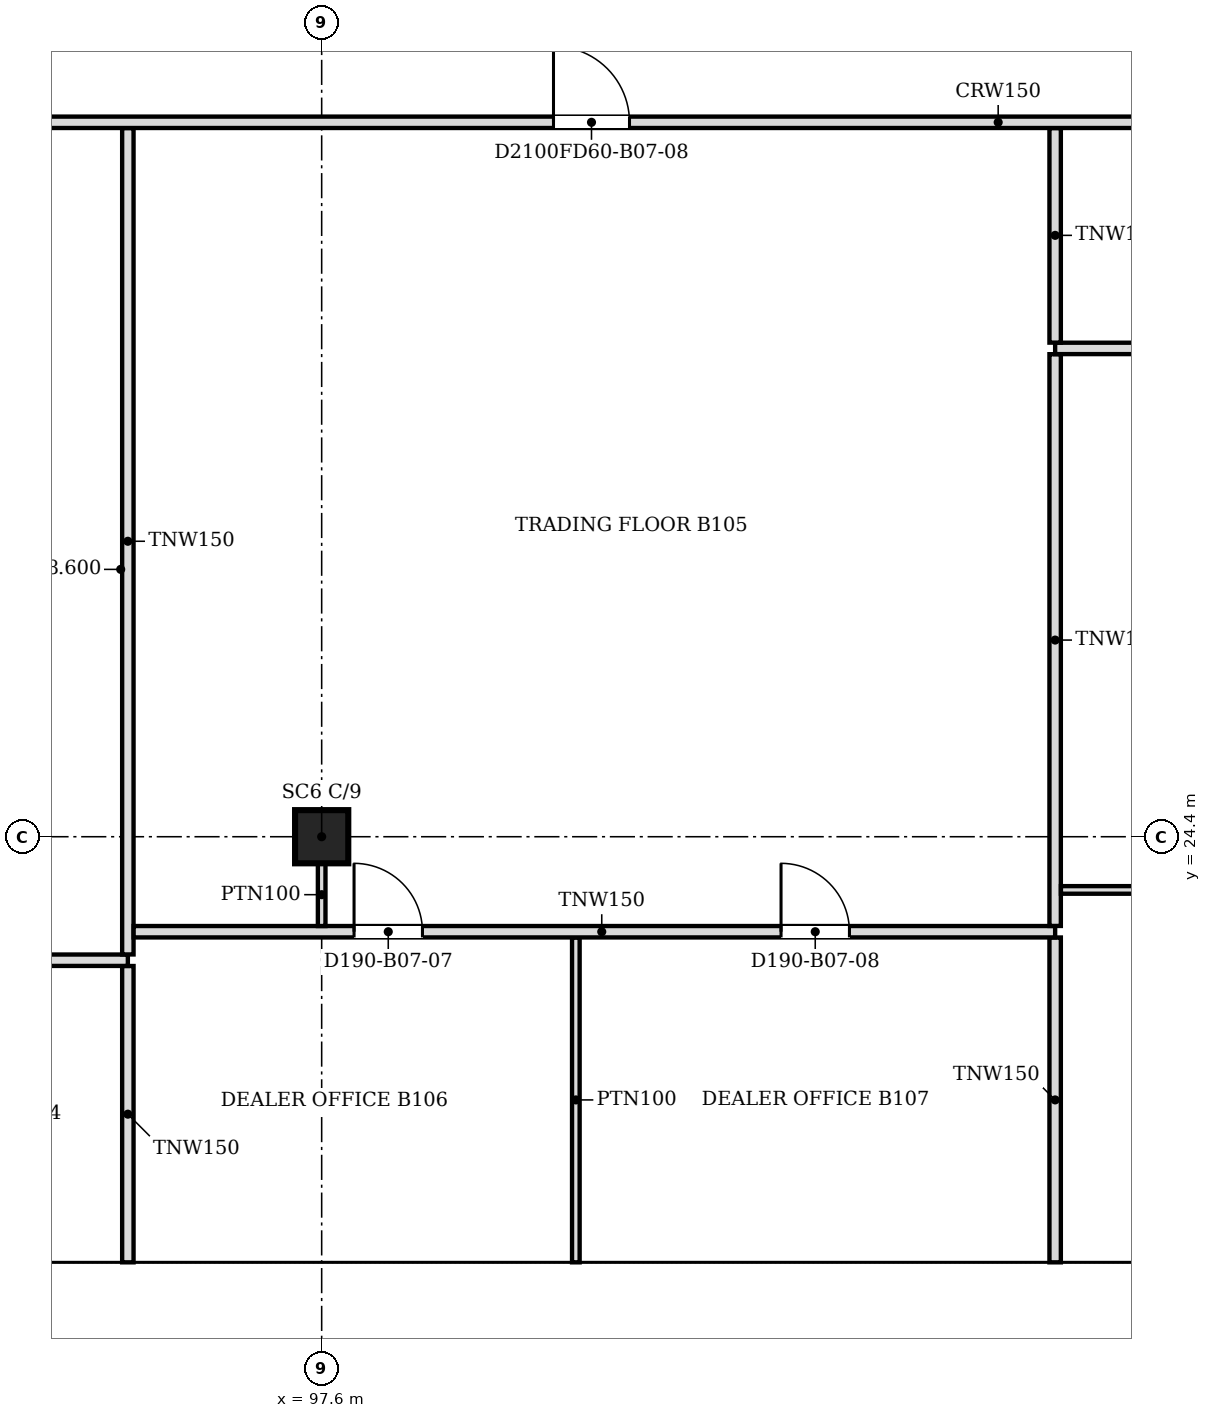
"""IFC4 building model, lengths in metres.
Left out: names, types, materials, properties, quantities, classifications, styles, units other than length and angle.
Written with IfcOpenShell. Run it as: python <this file> out.ifc"""

import sys

from ifc_helpers import new_model, si_unit, direction, frame, frame_2d, origin, origin_2d, place, context, subcontext, project, spatial, polyline, rectangle, outline, extrude, faceted_brep, source, transform, mapped, element, fill, save


model = new_model("IFC4")
c1 = context("Model", 3, precision=1e-05, world=origin(), true_north=direction((0.0, 1.0)))
c2 = subcontext(c1, "Body", "Model", "MODEL_VIEW")
j1 = project(units=[si_unit("LENGTHUNIT", "METRE"), si_unit("PLANEANGLEUNIT", "RADIAN")], contexts=[c1])
p1 = place(None, origin())
s1 = spatial("IfcSite", under=j1, at=p1, CompositionType="ELEMENT")
p2 = place(p1, origin())
s2 = spatial("IfcBuilding", under=s1, at=p2, CompositionType="ELEMENT")
p3 = place(p2, frame((0.0, 0.0, 68.6)))
s3 = spatial("IfcBuildingStorey", under=s2, at=p3, CompositionType="ELEMENT", Elevation=68.6)
p4 = place(p3, frame((97.6, 24.4, 0.0), z_axis=(0.0, 0.0, 1.0), x_axis=(1.0, 0.0, 0.0)))
e1 = element("IfcColumn", 1, at=p4, inside=s3, PredefinedType="COLUMN", context=c2, shape_type="SweptSolid", body=[
    extrude(rectangle(XDim=0.7, YDim=0.7, at=origin_2d()), origin(), (0.0, 0.0, 1.0), 3.6),
])
m1 = source(origin(), c2, "Body", "Brep", [
    faceted_brep([(3.05, -0.25, 0.0), (0.047, -0.25, 3.8), (0.0, -0.25, 3.74), (0.0, -0.25, 0.0), (0.093, 0.25, 3.741), (3.05, 0.25, 0.0), (0.093, 0.25, 0.0), (0.047, 0.0, 3.8)], [[[0, 1, 2, 3]], [[4, 5, 6]], [[5, 4, 7, 1, 0]], [[2, 1, 7]], [[6, 5, 0, 3]], [[6, 3, 2, 7, 4]]]),
])
p5 = place(p3, frame((91.5, 18.55, 0.0), z_axis=(0.0, 0.0, 1.0), x_axis=(1.0, 0.0, 0.0)))
e2 = element("IfcWall", 2, at=p5, inside=s3, PredefinedType="SOLIDWALL", context=c2, shape_type="MappedRepresentation", body=[
    mapped(m1, transform((0.0, 0.0, 0.0), scale=1.0)),
])
m2 = source(origin(), c2, "Body", "SweptSolid", [
    extrude(outline(polyline([(2.534, 0.25), (0.247, 3.144), (0.247, 0.25), (2.534, 0.25)])), frame((0.0, 0.26, 0.0), z_axis=(0.0, -1.0, 0.0), x_axis=(1.0, 0.0, 0.0)), (0.0, 0.0, 1.0), 0.52),
])
p6 = place(p5, origin())
e3 = element("IfcOpeningElement", 3, at=p6, cuts=e2, PredefinedType="OPENING", context=c2, shape_type="MappedRepresentation", body=[
    mapped(m2, transform((0.0, 0.0, 0.0), scale=1.0)),
])
m3 = source(origin(), c2, "Body", "Brep", [
    faceted_brep([(6.1, -0.25, 0.0), (3.05, -0.25, 3.8), (0.0, -0.25, 0.0), (6.1, -0.25, 0.0), (0.0, 0.25, 0.0), (3.05, 0.25, 3.8), (6.1, 0.25, 0.0), (6.1, 0.25, 0.0)], [[[0, 1, 2, 3]], [[4, 5, 6, 7]], [[6, 5, 1, 0]], [[5, 4, 2, 1]], [[4, 7, 3, 2]], [[3, 7, 6, 0]]]),
])
p7 = place(p3, frame((94.55, 18.55, 0.0), z_axis=(0.0, 0.0, 1.0), x_axis=(1.0, 0.0, 0.0)))
e4 = element("IfcWall", 4, at=p7, inside=s3, PredefinedType="SOLIDWALL", context=c2, shape_type="MappedRepresentation", body=[
    mapped(m3, transform((0.0, 0.0, 0.0), scale=1.0)),
])
m4 = source(origin(), c2, "Body", "SweptSolid", [
    extrude(outline(polyline([(5.579, 0.25), (3.05, 3.4), (0.521, 0.25), (5.579, 0.25)])), frame((0.0, 0.26, 0.0), z_axis=(0.0, -1.0, 0.0), x_axis=(1.0, 0.0, 0.0)), (0.0, 0.0, 1.0), 0.52),
])
p8 = place(p7, origin())
e5 = element("IfcOpeningElement", 5, at=p8, cuts=e4, PredefinedType="OPENING", context=c2, shape_type="MappedRepresentation", body=[
    mapped(m4, transform((0.0, 0.0, 0.0), scale=1.0)),
])
m5 = source(origin(), c2, "Body", "SweptSolid", [
    extrude(outline(polyline([(6.1, 0.0), (3.05, 3.8), (0.0, 0.0), (6.1, 0.0)])), frame((0.0, 0.25, 0.0), z_axis=(0.0, -1.0, 0.0), x_axis=(1.0, 0.0, 0.0)), (0.0, 0.0, 1.0), 0.5),
])
p9 = place(p3, frame((100.65, 18.55, 0.0), z_axis=(0.0, 0.0, 1.0), x_axis=(1.0, 0.0, 0.0)))
e6 = element("IfcWall", 6, at=p9, inside=s3, PredefinedType="SOLIDWALL", context=c2, shape_type="MappedRepresentation", body=[
    mapped(m5, transform((0.0, 0.0, 0.0), scale=1.0)),
])
p10 = place(p9, origin())
e7 = element("IfcOpeningElement", 7, at=p10, cuts=e6, PredefinedType="OPENING", context=c2, shape_type="MappedRepresentation", body=[
    mapped(m4, transform((0.0, 0.0, 0.0), scale=1.0)),
])
p11 = place(p3, frame((106.75, 18.55, 0.0), z_axis=(0.0, 0.0, 1.0), x_axis=(1.0, 0.0, 0.0)))
e8 = element("IfcWall", 8, at=p11, inside=s3, PredefinedType="SOLIDWALL", context=c2, shape_type="MappedRepresentation", body=[
    mapped(m5, transform((0.0, 0.0, 0.0), scale=1.0)),
])
p12 = place(p11, origin())
e9 = element("IfcOpeningElement", 9, at=p12, cuts=e8, PredefinedType="OPENING", context=c2, shape_type="MappedRepresentation", body=[
    mapped(m4, transform((0.0, 0.0, 0.0), scale=1.0)),
])
p13 = place(p2, frame((0.0, 0.0, 72.4)))
s4 = spatial("IfcBuildingStorey", under=s2, at=p13, CompositionType="ELEMENT", Elevation=72.4)
m6 = source(origin(), c2, "Body", "Brep", [
    faceted_brep([(3.003, -0.25, 0.0), (6.053, -0.25, 3.8), (3.003, -0.25, 7.6), (0.0, -0.25, 3.8), (0.047, 0.25, 3.859), (3.003, 0.25, 7.6), (6.053, 0.25, 3.8), (3.003, 0.25, 0.0), (0.047, 0.25, 3.741), (0.0, 0.0, 3.8)], [[[0, 1, 2, 3]], [[4, 5, 6, 7, 8]], [[7, 6, 1, 0]], [[6, 5, 2, 1]], [[5, 4, 9, 3, 2]], [[8, 7, 0, 3, 9]], [[8, 9, 4]]]),
])
p14 = place(p13, frame((91.547, 18.55, -3.8), z_axis=(0.0, 0.0, 1.0), x_axis=(1.0, 0.0, 0.0)))
e10 = element("IfcWall", 10, at=p14, inside=s4, PredefinedType="SOLIDWALL", context=c2, shape_type="MappedRepresentation", body=[
    mapped(m6, transform((0.0, 0.0, 0.0), scale=1.0)),
])
m7 = source(origin(), c2, "Body", "SweptSolid", [
    extrude(outline(polyline([(3.005, 0.401), (5.733, 3.8), (3.005, 7.199), (0.319, 3.8), (3.005, 0.401)])), frame((0.0, 0.26, 0.0), z_axis=(0.0, -1.0, 0.0), x_axis=(1.0, 0.0, 0.0)), (0.0, 0.0, 1.0), 0.52),
])
p15 = place(p14, origin())
e11 = element("IfcOpeningElement", 11, at=p15, cuts=e10, PredefinedType="OPENING", context=c2, shape_type="MappedRepresentation", body=[
    mapped(m7, transform((0.0, 0.0, 0.0), scale=1.0)),
])
m8 = source(origin(), c2, "Body", "Brep", [
    faceted_brep([(3.05, -0.25, 0.0), (6.1, -0.25, 3.8), (6.1, -0.25, 3.8), (3.05, -0.25, 7.6), (0.0, -0.25, 3.8), (0.0, 0.25, 3.8), (3.05, 0.25, 7.6), (6.1, 0.25, 3.8), (6.1, 0.25, 3.8), (3.05, 0.25, 0.0)], [[[0, 1, 2, 3, 4]], [[5, 6, 7, 8, 9]], [[9, 8, 1, 0]], [[7, 6, 3, 2]], [[6, 5, 4, 3]], [[5, 9, 0, 4]], [[1, 8, 7, 2]]]),
])
p16 = place(p13, frame((97.6, 18.55, -3.8), z_axis=(0.0, 0.0, 1.0), x_axis=(1.0, 0.0, 0.0)))
e12 = element("IfcWall", 12, at=p16, inside=s4, PredefinedType="SOLIDWALL", context=c2, shape_type="MappedRepresentation", body=[
    mapped(m8, transform((0.0, 0.0, 0.0), scale=1.0)),
])
m9 = source(origin(), c2, "Body", "SweptSolid", [
    extrude(outline(polyline([(3.05, 0.399), (5.78, 3.8), (3.05, 7.2), (0.321, 3.8), (3.05, 0.399)])), frame((0.0, 0.26, 0.0), z_axis=(0.0, -1.0, 0.0), x_axis=(1.0, 0.0, 0.0)), (0.0, 0.0, 1.0), 0.52),
])
p17 = place(p16, origin())
e13 = element("IfcOpeningElement", 13, at=p17, cuts=e12, PredefinedType="OPENING", context=c2, shape_type="MappedRepresentation", body=[
    mapped(m9, transform((0.0, 0.0, 0.0), scale=1.0)),
])
m10 = source(origin(), c2, "Body", "SweptSolid", [
    extrude(outline(polyline([(3.05, 0.0), (6.1, 3.8), (3.05, 7.6), (0.0, 3.8), (3.05, 0.0)])), frame((0.0, 0.25, 0.0), z_axis=(0.0, -1.0, 0.0), x_axis=(1.0, 0.0, 0.0)), (0.0, 0.0, 1.0), 0.5),
])
p18 = place(p13, frame((103.7, 18.55, -3.8), z_axis=(0.0, 0.0, 1.0), x_axis=(1.0, 0.0, 0.0)))
e14 = element("IfcWall", 14, at=p18, inside=s4, PredefinedType="SOLIDWALL", context=c2, shape_type="MappedRepresentation", body=[
    mapped(m10, transform((0.0, 0.0, 0.0), scale=1.0)),
])
p19 = place(p18, origin())
e15 = element("IfcOpeningElement", 15, at=p19, cuts=e14, PredefinedType="OPENING", context=c2, shape_type="MappedRepresentation", body=[
    mapped(m9, transform((0.0, 0.0, 0.0), scale=1.0)),
])
p20 = place(p3, frame((95.05, 18.8, 0.0), z_axis=(0.0, 0.0, 1.0), x_axis=(0.0, 1.0, 0.0)))
e16 = element("IfcWall", 16, at=p20, inside=s3, PredefinedType="PARTITIONING", context=c2, shape_type="SweptSolid", body=[
    extrude(rectangle(XDim=3.899, YDim=0.15, at=frame_2d((1.949, 0.0))), origin(), (0.0, 0.0, 1.0), 3.067),
])
p21 = place(p3, frame((100.944, 18.8, 0.0), z_axis=(0.0, 0.0, 1.0), x_axis=(0.0, 1.0, 0.0)))
e17 = element("IfcWall", 17, at=p21, inside=s3, PredefinedType="PARTITIONING", context=c2, shape_type="SweptSolid", body=[
    extrude(rectangle(XDim=4.274, YDim=0.1, at=frame_2d((2.137, 0.0))), origin(), (0.0, 0.0, 1.0), 3.067),
])
p22 = place(p3, frame((107.25, 18.8, 0.0), z_axis=(0.0, 0.0, 1.0), x_axis=(0.0, 1.0, 0.0)))
e18 = element("IfcWall", 18, at=p22, inside=s3, PredefinedType="PARTITIONING", context=c2, shape_type="SweptSolid", body=[
    extrude(rectangle(XDim=4.274, YDim=0.15, at=frame_2d((2.137, 0.0))), origin(), (0.0, 0.0, 1.0), 3.067),
])
p23 = place(p3, frame((95.05, 22.775, 0.0), z_axis=(0.0, 0.0, 1.0), x_axis=(-1.0, 0.0, 0.0)))
e19 = element("IfcWall", 19, at=p23, inside=s3, PredefinedType="PARTITIONING", context=c2, shape_type="SweptSolid", body=[
    extrude(rectangle(XDim=8.487, YDim=0.15, at=frame_2d((4.244, 0.0))), origin(), (0.0, 0.0, 1.0), 3.067),
])
m11 = source(origin(), c2, "Body", "SweptSolid", [
    extrude(rectangle(XDim=0.9, YDim=2.1, at=frame_2d((0.45, 1.05))), frame((0.0, 0.085, 0.0), z_axis=(0.0, -1.0, 0.0), x_axis=(1.0, 0.0, 0.0)), (0.0, 0.0, 1.0), 0.17),
])
p24 = place(p23, frame((6.187, 0.0, 0.0)))
e20 = element("IfcOpeningElement", 20, at=p24, cuts=e19, PredefinedType="OPENING", context=c2, shape_type="MappedRepresentation", body=[
    mapped(m11, transform((0.0, 0.0, 0.0), scale=1.0)),
])
p25 = place(p23, frame((1.93, 0.0, 0.0)))
e21 = element("IfcOpeningElement", 21, at=p25, cuts=e19, PredefinedType="OPENING", context=c2, shape_type="MappedRepresentation", body=[
    mapped(m11, transform((0.0, 0.0, 0.0), scale=1.0)),
])
p26 = place(p3, frame((95.05, 22.851, 0.0), z_axis=(0.0, 0.0, 1.0), x_axis=(0.0, 1.0, 0.0)))
e22 = element("IfcWall", 22, at=p26, inside=s3, PredefinedType="PARTITIONING", context=c2, shape_type="SweptSolid", body=[
    extrude(rectangle(XDim=10.873, YDim=0.15, at=frame_2d((5.437, 0.0))), origin(), (0.0, 0.0, 1.0), 3.067),
])
p27 = place(p3, frame((107.25, 23.15, 0.0), z_axis=(0.0, 0.0, 1.0), x_axis=(-1.0, 0.0, 0.0)))
e23 = element("IfcWall", 23, at=p27, inside=s3, PredefinedType="PARTITIONING", context=c2, shape_type="SweptSolid", body=[
    extrude(rectangle(XDim=12.124, YDim=0.15, at=frame_2d((6.062, 0.0))), origin(), (0.0, 0.0, 1.0), 3.067),
])
p28 = place(p27, frame((8.324, 0.0, 0.0)))
e24 = element("IfcOpeningElement", 24, at=p28, cuts=e23, PredefinedType="OPENING", context=c2, shape_type="MappedRepresentation", body=[
    mapped(m11, transform((0.0, 0.0, 0.0), scale=1.0)),
])
p29 = place(p27, frame((2.706, 0.0, 0.0)))
e25 = element("IfcOpeningElement", 25, at=p29, cuts=e23, PredefinedType="OPENING", context=c2, shape_type="MappedRepresentation", body=[
    mapped(m11, transform((0.0, 0.0, 0.0), scale=1.0)),
])
p30 = place(p3, frame((107.25, 23.226, 0.0), z_axis=(0.0, 0.0, 1.0), x_axis=(0.0, 1.0, 0.0)))
e26 = element("IfcWall", 26, at=p30, inside=s3, PredefinedType="PARTITIONING", context=c2, shape_type="SweptSolid", body=[
    extrude(rectangle(XDim=7.523, YDim=0.15, at=frame_2d((3.761, 0.0))), origin(), (0.0, 0.0, 1.0), 3.067),
])
p31 = place(p3, frame((112.094, 23.7, 0.0), z_axis=(0.0, 0.0, 1.0), x_axis=(-1.0, 0.0, 0.0)))
e27 = element("IfcWall", 27, at=p31, inside=s3, PredefinedType="PARTITIONING", context=c2, shape_type="SweptSolid", body=[
    extrude(rectangle(XDim=4.768, YDim=0.1, at=frame_2d((2.384, 0.0))), origin(), (0.0, 0.0, 1.0), 3.067),
])
m12 = source(origin(), c2, "Body", "SweptSolid", [
    extrude(rectangle(XDim=0.9, YDim=2.1, at=frame_2d((0.45, 1.05))), frame((0.0, 0.06, 0.0), z_axis=(0.0, -1.0, 0.0), x_axis=(1.0, 0.0, 0.0)), (0.0, 0.0, 1.0), 0.12),
])
p32 = place(p31, frame((2.668, 0.0, 0.0)))
e28 = element("IfcOpeningElement", 28, at=p32, cuts=e27, PredefinedType="OPENING", context=c2, shape_type="MappedRepresentation", body=[
    mapped(m12, transform((0.0, 0.0, 0.0), scale=1.0)),
])
p33 = place(p3, frame((97.6, 24.05, 0.0), z_axis=(0.0, 0.0, 1.0), x_axis=(0.0, -1.0, 0.0)))
e29 = element("IfcWall", 29, at=p33, inside=s3, PredefinedType="PARTITIONING", context=c2, shape_type="SweptSolid", body=[
    extrude(rectangle(XDim=0.825, YDim=0.1, at=frame_2d((0.413, 0.0))), origin(), (0.0, 0.0, 1.0), 3.067),
])
p34 = place(p3, frame((116.4, 30.825, 0.0), z_axis=(0.0, 0.0, 1.0), x_axis=(-1.0, 0.0, 0.0)))
e30 = element("IfcWall", 30, at=p34, inside=s3, PredefinedType="PARTITIONING", context=c2, shape_type="SweptSolid", body=[
    extrude(rectangle(XDim=9.15, YDim=0.15, at=frame_2d((4.575, 0.0))), origin(), (0.0, 0.0, 1.0), 3.067),
])
p35 = place(p34, frame((4.15, 0.0, 0.0)))
e31 = element("IfcOpeningElement", 31, at=p35, cuts=e30, PredefinedType="OPENING", context=c2, shape_type="MappedRepresentation", body=[
    mapped(m11, transform((0.0, 0.0, 0.0), scale=1.0)),
])
p36 = place(p3, frame((107.25, 30.901, 0.0), z_axis=(0.0, 0.0, 1.0), x_axis=(0.0, 1.0, 0.0)))
e32 = element("IfcWall", 32, at=p36, inside=s3, PredefinedType="PARTITIONING", context=c2, shape_type="SweptSolid", body=[
    extrude(rectangle(XDim=2.823, YDim=0.15, at=frame_2d((1.412, 0.0))), origin(), (0.0, 0.0, 1.0), 3.067),
])
p37 = place(p3, frame((133.7, 33.8, 0.0), z_axis=(0.0, 0.0, 1.0), x_axis=(-1.0, 0.0, 0.0)))
e33 = element("IfcWall", 33, at=p37, inside=s3, PredefinedType="PARTITIONING", context=c2, shape_type="SweptSolid", body=[
    extrude(rectangle(XDim=47.8, YDim=0.15, at=frame_2d((23.9, 0.0))), origin(), (0.0, 0.0, 1.0), 3.067),
])
m13 = source(origin(), c2, "Body", "SweptSolid", [
    extrude(rectangle(XDim=1.0, YDim=2.1, at=frame_2d((0.5, 1.05))), frame((0.0, 0.085, 0.0), z_axis=(0.0, -1.0, 0.0), x_axis=(1.0, 0.0, 0.0)), (0.0, 0.0, 1.0), 0.17),
])
p38 = place(p37, frame((3.549, 0.0, 0.0)))
e34 = element("IfcOpeningElement", 34, at=p38, cuts=e33, PredefinedType="OPENING", context=c2, shape_type="MappedRepresentation", body=[
    mapped(m13, transform((0.0, 0.0, 0.0), scale=1.0)),
])
p39 = place(p37, frame((42.7, 0.0, 0.0)))
e35 = element("IfcOpeningElement", 35, at=p39, cuts=e33, PredefinedType="OPENING", context=c2, shape_type="MappedRepresentation", body=[
    mapped(m13, transform((0.0, 0.0, 0.0), scale=1.0)),
])
p40 = place(p37, frame((12.199, 0.0, 0.0)))
e36 = element("IfcOpeningElement", 36, at=p40, cuts=e33, PredefinedType="OPENING", context=c2, shape_type="MappedRepresentation", body=[
    mapped(m13, transform((0.0, 0.0, 0.0), scale=1.0)),
])
p41 = place(p37, frame((21.349, 0.0, 0.0)))
e37 = element("IfcOpeningElement", 37, at=p41, cuts=e33, PredefinedType="OPENING", context=c2, shape_type="MappedRepresentation", body=[
    mapped(m13, transform((0.0, 0.0, 0.0), scale=1.0)),
])
p42 = place(p37, frame((32.05, 0.0, 0.0)))
e38 = element("IfcOpeningElement", 38, at=p42, cuts=e33, PredefinedType="OPENING", context=c2, shape_type="MappedRepresentation", body=[
    mapped(m13, transform((0.0, 0.0, 0.0), scale=1.0)),
])
m14 = source(origin(), c2, "Body", "SweptSolid", [
    extrude(rectangle(XDim=0.9, YDim=2.1, at=frame_2d((0.45, 1.05))), frame((0.0, 0.025, 0.0), z_axis=(0.0, -1.0, 0.0), x_axis=(1.0, 0.0, 0.0)), (0.0, 0.0, 1.0), 0.05),
])
p43 = place(p28, origin())
e39 = element("IfcDoor", 39, at=p43, inside=s3, OperationType="SINGLE_SWING_RIGHT", PredefinedType="DOOR", context=c2, shape_type="MappedRepresentation", body=[
    mapped(m14, transform((0.0, 0.0, 0.0), scale=1.0)),
])
fill(e24, e39)
p44 = place(p29, origin())
e40 = element("IfcDoor", 40, at=p44, inside=s3, OperationType="SINGLE_SWING_RIGHT", PredefinedType="DOOR", context=c2, shape_type="MappedRepresentation", body=[
    mapped(m14, transform((0.0, 0.0, 0.0), scale=1.0)),
])
fill(e25, e40)
m15 = source(origin(), c2, "Body", "SweptSolid", [
    extrude(rectangle(XDim=1.0, YDim=2.1, at=frame_2d((0.5, 1.05))), frame((0.0, 0.025, 0.0), z_axis=(0.0, -1.0, 0.0), x_axis=(1.0, 0.0, 0.0)), (0.0, 0.0, 1.0), 0.05),
])
p45 = place(p42, origin())
e41 = element("IfcDoor", 41, at=p45, inside=s3, OperationType="SINGLE_SWING_RIGHT", PredefinedType="DOOR", context=c2, shape_type="MappedRepresentation", body=[
    mapped(m15, transform((0.0, 0.0, 0.0), scale=1.0)),
])
fill(e38, e41)
save(model, sys.argv[1])
